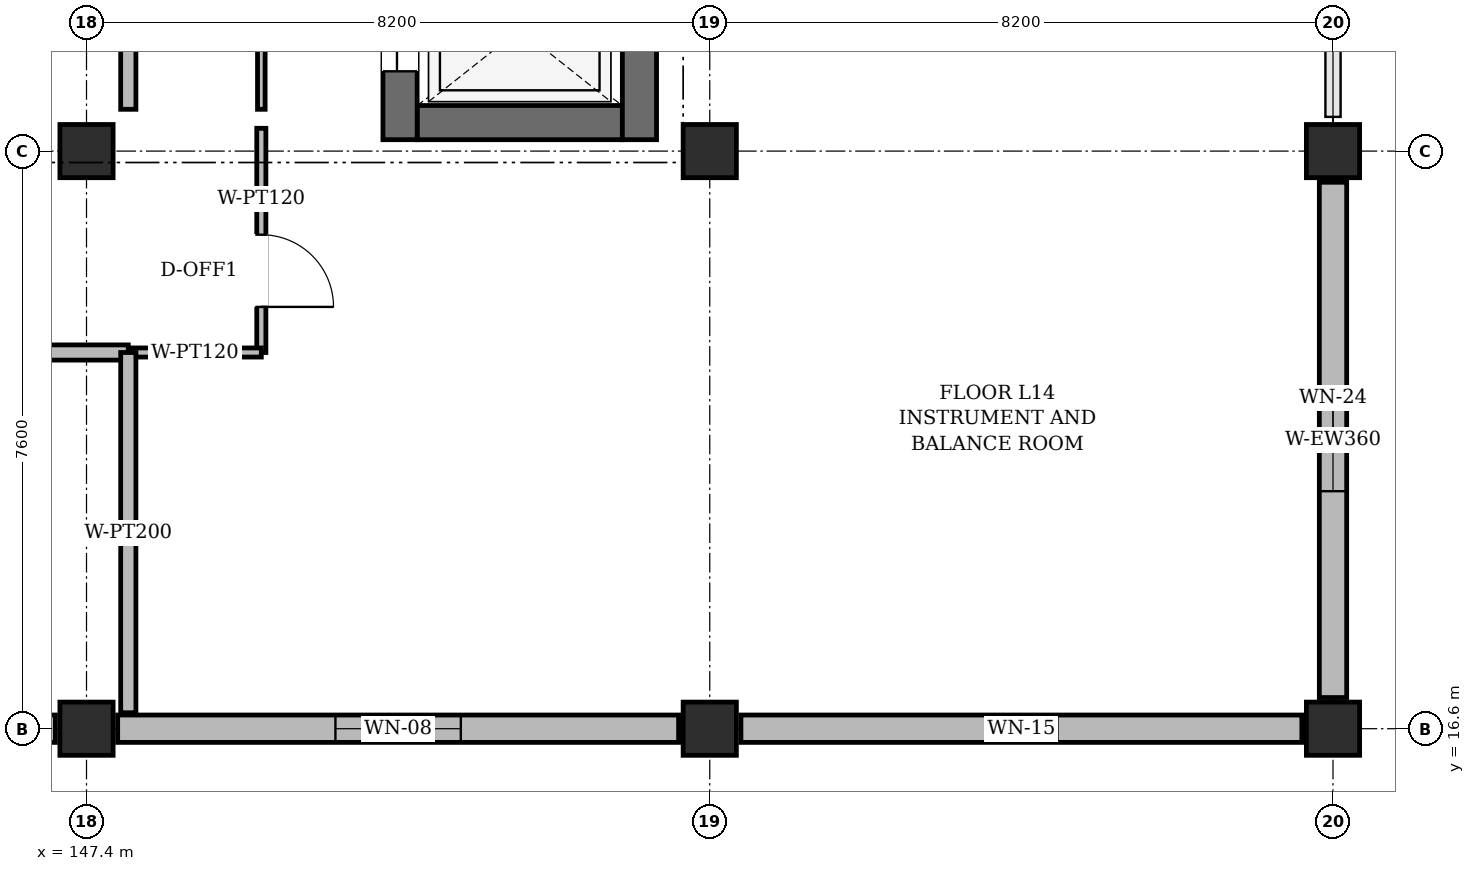
"""IFC4 building model, lengths in metres.
Left out: names, types, materials, properties, quantities, classifications, styles, units other than length and angle.
Written with IfcOpenShell. Run it as: python <this file> out.ifc"""

import sys

from ifc_helpers import new_model, si_unit, direction, frame, frame_2d, origin, origin_2d, place, context, subcontext, project, spatial, rectangle, extrude, element, fill, save


model = new_model("IFC4")
c1 = context("Model", 3, precision=1e-05, world=origin(), true_north=direction((0.0, 1.0)))
c2 = subcontext(c1, "Body", "Model", "MODEL_VIEW")
j1 = project(units=[si_unit("LENGTHUNIT", "METRE"), si_unit("PLANEANGLEUNIT", "RADIAN")], contexts=[c1])
p1 = place(None, origin())
s1 = spatial("IfcSite", under=j1, at=p1, CompositionType="ELEMENT")
p2 = place(p1, origin())
s2 = spatial("IfcBuilding", under=s1, at=p2, CompositionType="ELEMENT")
p3 = place(p2, frame((0.0, 0.0, 61.8)))
s3 = spatial("IfcBuildingStorey", under=s2, at=p3, CompositionType="ELEMENT", Elevation=61.8)
p4 = place(p3, frame((147.4, 16.6, 0.0), z_axis=(0.0, 0.0, 1.0), x_axis=(1.0, 0.0, 0.0)))
e1 = element("IfcColumn", 1, at=p4, inside=s3, PredefinedType="COLUMN", context=c2, shape_type="SweptSolid", body=[
    extrude(rectangle(XDim=0.7, YDim=0.7, at=origin_2d()), origin(), (0.0, 0.0, 1.0), 4.145),
])
p5 = place(p3, frame((147.4, 24.2, 0.0), z_axis=(0.0, 0.0, 1.0), x_axis=(1.0, 0.0, 0.0)))
e2 = element("IfcColumn", 2, at=p5, inside=s3, PredefinedType="COLUMN", context=c2, shape_type="SweptSolid", body=[
    extrude(rectangle(XDim=0.7, YDim=0.7, at=origin_2d()), origin(), (0.0, 0.0, 1.0), 4.11),
])
p6 = place(p3, frame((155.6, 16.6, 0.0), z_axis=(0.0, 0.0, 1.0), x_axis=(1.0, 0.0, 0.0)))
e3 = element("IfcColumn", 3, at=p6, inside=s3, PredefinedType="COLUMN", context=c2, shape_type="SweptSolid", body=[
    extrude(rectangle(XDim=0.7, YDim=0.7, at=origin_2d()), origin(), (0.0, 0.0, 1.0), 4.145),
])
p7 = place(p3, frame((155.6, 24.2, 0.0), z_axis=(0.0, 0.0, 1.0), x_axis=(1.0, 0.0, 0.0)))
e4 = element("IfcColumn", 4, at=p7, inside=s3, PredefinedType="COLUMN", context=c2, shape_type="SweptSolid", body=[
    extrude(rectangle(XDim=0.7, YDim=0.7, at=origin_2d()), origin(), (0.0, 0.0, 1.0), 4.11),
])
for number, where, z_axis, x_axis in (
    (5, (163.8, 16.6, 0.0), (0.0, 0.0, 1.0), (1.0, 0.0, 0.0)),
    (6, (163.8, 24.2, 0.0), (0.0, 0.0, 1.0), (1.0, 0.0, 0.0)),
):
    element("IfcColumn", number, at=place(p3, frame(where, z_axis=z_axis, x_axis=x_axis)), inside=s3, PredefinedType="COLUMN", context=c2, shape_type="SweptSolid", body=[
        extrude(rectangle(XDim=0.7, YDim=0.7, at=origin_2d()), origin(), (0.0, 0.0, 1.0), 4.145),
    ])
p8 = place(p3, frame((139.61, 16.6, 0.0), z_axis=(0.0, 0.0, 1.0), x_axis=(1.0, 0.0, 0.0)))
e7 = element("IfcWall", 7, at=p8, inside=s3, PredefinedType="SOLIDWALL", context=c2, shape_type="SweptSolid", body=[
    extrude(rectangle(XDim=7.38, YDim=0.36, at=frame_2d((3.69, 0.0))), origin(), (0.0, 0.0, 1.0), 3.53),
])
p9 = place(p8, frame((3.24, 0.0, 0.95)))
e8 = element("IfcOpeningElement", 8, at=p9, cuts=e7, PredefinedType="OPENING", context=c2, shape_type="SweptSolid", body=[
    extrude(rectangle(XDim=0.9, YDim=2.1, at=frame_2d((0.45, 1.05))), frame((0.0, 0.192, 0.0), z_axis=(0.0, -1.0, 0.0), x_axis=(1.0, 0.0, 0.0)), (0.0, 0.0, 1.0), 0.384),
])
p10 = place(p3, frame((147.81, 16.6, 0.0), z_axis=(0.0, 0.0, 1.0), x_axis=(1.0, 0.0, 0.0)))
e9 = element("IfcWall", 9, at=p10, inside=s3, PredefinedType="SOLIDWALL", context=c2, shape_type="SweptSolid", body=[
    extrude(rectangle(XDim=7.38, YDim=0.36, at=frame_2d((3.69, 0.0))), origin(), (0.0, 0.0, 1.0), 3.53),
])
p11 = place(p10, frame((2.865, 0.0, 0.95)))
e10 = element("IfcOpeningElement", 10, at=p11, cuts=e9, PredefinedType="OPENING", context=c2, shape_type="SweptSolid", body=[
    extrude(rectangle(XDim=1.65, YDim=2.0, at=frame_2d((0.825, 1.0))), frame((0.0, 0.192, 0.0), z_axis=(0.0, -1.0, 0.0), x_axis=(1.0, 0.0, 0.0)), (0.0, 0.0, 1.0), 0.384),
])
p12 = place(p3, frame((156.01, 16.6, 0.0), z_axis=(0.0, 0.0, 1.0), x_axis=(1.0, 0.0, 0.0)))
e11 = element("IfcWall", 11, at=p12, inside=s3, PredefinedType="SOLIDWALL", context=c2, shape_type="SweptSolid", body=[
    extrude(rectangle(XDim=7.38, YDim=0.36, at=frame_2d((3.69, 0.0))), origin(), (0.0, 0.0, 1.0), 3.53),
])
p13 = place(p12, frame((3.215, 0.0, 0.95)))
e12 = element("IfcOpeningElement", 12, at=p13, cuts=e11, PredefinedType="OPENING", context=c2, shape_type="SweptSolid", body=[
    extrude(rectangle(XDim=0.95, YDim=1.75, at=frame_2d((0.475, 0.875))), frame((0.0, 0.192, 0.0), z_axis=(0.0, -1.0, 0.0), x_axis=(1.0, 0.0, 0.0)), (0.0, 0.0, 1.0), 0.384),
])
p14 = place(p3, frame((163.8, 17.01, 0.0), z_axis=(0.0, 0.0, 1.0), x_axis=(0.0, 1.0, 0.0)))
e13 = element("IfcWall", 13, at=p14, inside=s3, PredefinedType="SOLIDWALL", context=c2, shape_type="SweptSolid", body=[
    extrude(rectangle(XDim=6.78, YDim=0.36, at=frame_2d((3.39, 0.0))), origin(), (0.0, 0.0, 1.0), 3.53),
])
p15 = place(p14, frame((2.715, 0.0, 0.95)))
e14 = element("IfcOpeningElement", 14, at=p15, cuts=e13, PredefinedType="OPENING", context=c2, shape_type="SweptSolid", body=[
    extrude(rectangle(XDim=1.35, YDim=2.05, at=frame_2d((0.675, 1.025))), frame((0.0, 0.192, 0.0), z_axis=(0.0, -1.0, 0.0), x_axis=(1.0, 0.0, 0.0)), (0.0, 0.0, 1.0), 0.384),
])
p16 = place(p3, frame((151.75, 24.575, 0.0), z_axis=(0.0, 0.0, 1.0), x_axis=(1.0, 0.0, 0.0)))
e15 = element("IfcWall", 15, at=p16, inside=s3, PredefinedType="SHEAR", context=c2, shape_type="SweptSolid", body=[
    extrude(rectangle(XDim=2.7, YDim=0.45, at=frame_2d((1.35, 0.0))), origin(), (0.0, 0.0, 1.0), 4.11),
])
p17 = place(p3, frame((151.525, 24.35, 0.0), z_axis=(0.0, 0.0, 1.0), x_axis=(0.0, 1.0, 0.0)))
e16 = element("IfcWall", 16, at=p17, inside=s3, PredefinedType="SHEAR", context=c2, shape_type="SweptSolid", body=[
    extrude(rectangle(XDim=2.9, YDim=0.45, at=frame_2d((1.45, 0.0))), origin(), (0.0, 0.0, 1.0), 4.11),
])
p18 = place(p17, frame((0.9, 0.0, 0.0)))
e17 = element("IfcOpeningElement", 17, at=p18, cuts=e16, PredefinedType="OPENING", context=c2, shape_type="SweptSolid", body=[
    extrude(rectangle(XDim=1.1, YDim=2.2, at=frame_2d((0.55, 1.1))), frame((0.0, 0.237, 0.0), z_axis=(0.0, -1.0, 0.0), x_axis=(1.0, 0.0, 0.0)), (0.0, 0.0, 1.0), 0.474),
])
p19 = place(p3, frame((154.675, 24.35, 0.0), z_axis=(0.0, 0.0, 1.0), x_axis=(0.0, 1.0, 0.0)))
e18 = element("IfcWall", 18, at=p19, inside=s3, PredefinedType="SHEAR", context=c2, shape_type="SweptSolid", body=[
    extrude(rectangle(XDim=2.9, YDim=0.45, at=frame_2d((1.45, 0.0))), origin(), (0.0, 0.0, 1.0), 4.11),
])
p20 = place(p3, frame((147.95, 31.75, 0.0), z_axis=(0.0, 0.0, 1.0), x_axis=(0.0, -1.0, 0.0)))
e19 = element("IfcWall", 19, at=p20, inside=s3, PredefinedType="PARTITIONING", context=c2, shape_type="SweptSolid", body=[
    extrude(rectangle(XDim=7.0, YDim=0.2, at=frame_2d((3.5, 0.0))), origin(), (0.0, 0.0, 1.0), 4.005),
])
p21 = place(p20, frame((2.75, 0.0, 0.0)))
e20 = element("IfcOpeningElement", 20, at=p21, cuts=e19, PredefinedType="OPENING", context=c2, shape_type="SweptSolid", body=[
    extrude(rectangle(XDim=1.5, YDim=2.2, at=frame_2d((0.75, 1.1))), frame((0.0, 0.112, 0.0), z_axis=(0.0, -1.0, 0.0), x_axis=(1.0, 0.0, 0.0)), (0.0, 0.0, 1.0), 0.224),
])
p22 = place(p3, frame((149.7, 24.75, 0.0), z_axis=(0.0, 0.0, 1.0), x_axis=(0.0, 1.0, 0.0)))
e21 = element("IfcWall", 21, at=p22, inside=s3, PredefinedType="PARTITIONING", context=c2, shape_type="SweptSolid", body=[
    extrude(rectangle(XDim=11.3, YDim=0.1, at=frame_2d((5.65, 0.0))), origin(), (0.0, 0.0, 1.0), 4.005),
])
p23 = place(p22, frame((4.75, 0.0, 0.0)))
e22 = element("IfcOpeningElement", 22, at=p23, cuts=e21, PredefinedType="OPENING", context=c2, shape_type="SweptSolid", body=[
    extrude(rectangle(XDim=1.8, YDim=2.4, at=frame_2d((0.9, 1.2))), frame((0.0, 0.062, 0.0), z_axis=(0.0, -1.0, 0.0), x_axis=(1.0, 0.0, 0.0)), (0.0, 0.0, 1.0), 0.124),
])
p24 = place(p3, frame((147.95, 21.55, 0.0), z_axis=(0.0, 0.0, 1.0), x_axis=(-1.0, 0.0, 0.0)))
e23 = element("IfcWall", 23, at=p24, inside=s3, PredefinedType="PARTITIONING", context=c2, shape_type="SweptSolid", body=[
    extrude(rectangle(XDim=16.95, YDim=0.2, at=frame_2d((8.475, 0.0))), origin(), (0.0, 0.0, 1.0), 3.685),
])
p25 = place(p24, frame((7.675, 0.0, 0.0)))
e24 = element("IfcOpeningElement", 24, at=p25, cuts=e23, PredefinedType="OPENING", context=c2, shape_type="SweptSolid", body=[
    extrude(rectangle(XDim=1.6, YDim=2.3, at=frame_2d((0.8, 1.15))), frame((0.0, 0.112, 0.0), z_axis=(0.0, -1.0, 0.0), x_axis=(1.0, 0.0, 0.0)), (0.0, 0.0, 1.0), 0.224),
])
p26 = place(p3, frame((149.7, 24.5, 0.0), z_axis=(0.0, 0.0, 1.0), x_axis=(0.0, -1.0, 0.0)))
e25 = element("IfcWall", 25, at=p26, inside=s3, PredefinedType="PARTITIONING", context=c2, shape_type="SweptSolid", body=[
    extrude(rectangle(XDim=0.8, YDim=0.12, at=frame_2d((0.4, 0.0))), origin(), (0.0, 0.0, 1.0), 4.005),
])
p27 = place(p3, frame((149.7, 23.7, 0.0), z_axis=(0.0, 0.0, 1.0), x_axis=(0.0, -1.0, 0.0)))
e26 = element("IfcWall", 26, at=p27, inside=s3, PredefinedType="PARTITIONING", context=c2, shape_type="SweptSolid", body=[
    extrude(rectangle(XDim=2.15, YDim=0.12, at=frame_2d((1.075, 0.0))), origin(), (0.0, 0.0, 1.0), 4.005),
])
p28 = place(p27, frame((0.6, 0.0, 0.0)))
e27 = element("IfcOpeningElement", 27, at=p28, cuts=e26, PredefinedType="OPENING", context=c2, shape_type="SweptSolid", body=[
    extrude(rectangle(XDim=0.95, YDim=2.2, at=frame_2d((0.475, 1.1))), frame((0.0, 0.072, 0.0), z_axis=(0.0, -1.0, 0.0), x_axis=(1.0, 0.0, 0.0)), (0.0, 0.0, 1.0), 0.144),
])
p29 = place(p3, frame((149.7, 21.55, 0.0), z_axis=(0.0, 0.0, 1.0), x_axis=(-1.0, 0.0, 0.0)))
e28 = element("IfcWall", 28, at=p29, inside=s3, PredefinedType="PARTITIONING", context=c2, shape_type="SweptSolid", body=[
    extrude(rectangle(XDim=1.75, YDim=0.12, at=frame_2d((0.875, 0.0))), origin(), (0.0, 0.0, 1.0), 3.685),
])
p30 = place(p3, frame((147.95, 21.55, 0.0), z_axis=(0.0, 0.0, 1.0), x_axis=(0.0, -1.0, 0.0)))
e29 = element("IfcWall", 29, at=p30, inside=s3, PredefinedType="PARTITIONING", context=c2, shape_type="SweptSolid", body=[
    extrude(rectangle(XDim=4.74, YDim=0.2, at=frame_2d((2.37, 0.0))), origin(), (0.0, 0.0, 1.0), 4.005),
])
p31 = place(p11, origin())
e30 = element("IfcWindow", 30, at=p31, inside=s3, PartitioningType="DOUBLE_PANEL_VERTICAL", PredefinedType="WINDOW", context=c2, shape_type="SweptSolid", body=[
    extrude(rectangle(XDim=1.65, YDim=2.0, at=frame_2d((0.825, 1.0))), frame((0.0, 0.03, 0.0), z_axis=(0.0, -1.0, 0.0), x_axis=(1.0, 0.0, 0.0)), (0.0, 0.0, 1.0), 0.06),
])
fill(e10, e30)
p32 = place(p13, origin())
e31 = element("IfcWindow", 31, at=p32, inside=s3, PartitioningType="SINGLE_PANEL", PredefinedType="WINDOW", context=c2, shape_type="SweptSolid", body=[
    extrude(rectangle(XDim=0.95, YDim=1.75, at=frame_2d((0.475, 0.875))), frame((0.0, 0.03, 0.0), z_axis=(0.0, -1.0, 0.0), x_axis=(1.0, 0.0, 0.0)), (0.0, 0.0, 1.0), 0.06),
])
fill(e12, e31)
p33 = place(p15, origin())
e32 = element("IfcWindow", 32, at=p33, inside=s3, PartitioningType="SINGLE_PANEL", PredefinedType="WINDOW", context=c2, shape_type="SweptSolid", body=[
    extrude(rectangle(XDim=1.35, YDim=2.05, at=frame_2d((0.675, 1.025))), frame((0.0, 0.03, 0.0), z_axis=(0.0, -1.0, 0.0), x_axis=(1.0, 0.0, 0.0)), (0.0, 0.0, 1.0), 0.06),
])
fill(e14, e32)
p34 = place(p18, origin())
e33 = element("IfcDoor", 33, at=p34, inside=s3, OperationType="DOUBLE_DOOR_SLIDING", PredefinedType="DOOR", context=c2, shape_type="SweptSolid", body=[
    extrude(rectangle(XDim=1.1, YDim=2.2, at=frame_2d((0.55, 1.1))), frame((0.0, 0.025, 0.0), z_axis=(0.0, -1.0, 0.0), x_axis=(1.0, 0.0, 0.0)), (0.0, 0.0, 1.0), 0.05),
])
fill(e17, e33)
p35 = place(p28, origin())
e34 = element("IfcDoor", 34, at=p35, inside=s3, OperationType="SINGLE_SWING_RIGHT", PredefinedType="DOOR", context=c2, shape_type="SweptSolid", body=[
    extrude(rectangle(XDim=0.95, YDim=2.2, at=frame_2d((0.475, 1.1))), frame((0.0, 0.025, 0.0), z_axis=(0.0, -1.0, 0.0), x_axis=(1.0, 0.0, 0.0)), (0.0, 0.0, 1.0), 0.05),
])
fill(e27, e34)
save(model, sys.argv[1])
